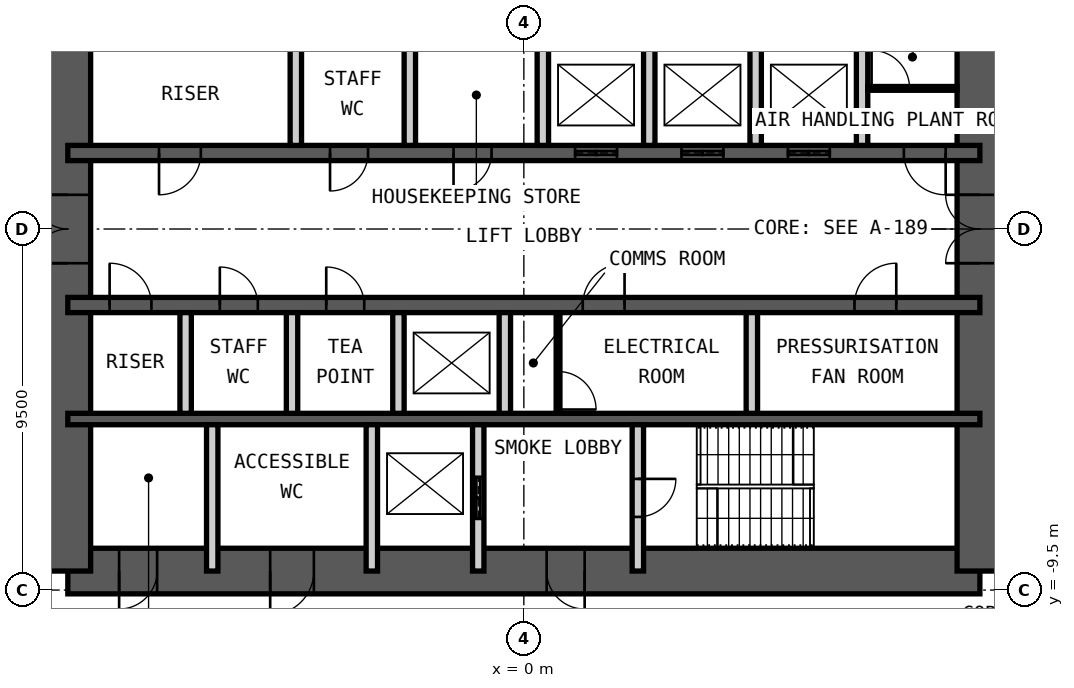
"""IFC4 building model, lengths in metres.
Left out: names, types, materials, properties, quantities, classifications, styles, units other than length and angle.
Written with IfcOpenShell. Run it as: python <this file> out.ifc"""

import sys

from ifc_helpers import new_model, si_unit, direction, frame, frame_2d, origin, place, context, subcontext, project, spatial, rectangle, extrude, element, fill, save


model = new_model("IFC4")
c1 = context("Model", 3, precision=1e-05, world=origin(), true_north=direction((0.0, 1.0)))
c2 = subcontext(c1, "Body", "Model", "MODEL_VIEW")
j1 = project(units=[si_unit("LENGTHUNIT", "METRE"), si_unit("PLANEANGLEUNIT", "RADIAN")], contexts=[c1])
p1 = place(None, origin())
s1 = spatial("IfcSite", under=j1, at=p1, CompositionType="ELEMENT")
p2 = place(p1, origin())
s2 = spatial("IfcBuilding", under=s1, at=p2, CompositionType="ELEMENT")
p3 = place(p2, frame((0.0, 0.0, 205.6)))
s3 = spatial("IfcBuildingStorey", under=s2, at=p3, CompositionType="ELEMENT", Elevation=205.6)
p4 = place(p3, frame((-12.0, -9.0, 0.0), z_axis=(0.0, 0.0, 1.0), x_axis=(1.0, 0.0, 0.0)))
e1 = element("IfcWall", 1, at=p4, inside=s3, PredefinedType="SHEAR", context=c2, shape_type="SweptSolid", body=[
    extrude(rectangle(XDim=24.0, YDim=1.2, at=frame_2d((12.0, 0.0))), origin(), (0.0, 0.0, 1.0), 4.2),
])
p5 = place(p4, frame((1.35, 0.0, 0.0)))
e2 = element("IfcOpeningElement", 2, at=p5, cuts=e1, PredefinedType="OPENING", context=c2, shape_type="SweptSolid", body=[
    extrude(rectangle(XDim=1.0, YDim=2.1, at=frame_2d((0.5, 1.05))), frame((0.0, 0.61, 0.0), z_axis=(0.0, -1.0, 0.0), x_axis=(1.0, 0.0, 0.0)), (0.0, 0.0, 1.0), 1.22),
])
p6 = place(p4, frame((5.325, 0.0, 0.0)))
e3 = element("IfcOpeningElement", 3, at=p6, cuts=e1, PredefinedType="OPENING", context=c2, shape_type="SweptSolid", body=[
    extrude(rectangle(XDim=1.15, YDim=2.1, at=frame_2d((0.575, 1.05))), frame((0.0, 0.61, 0.0), z_axis=(0.0, -1.0, 0.0), x_axis=(1.0, 0.0, 0.0)), (0.0, 0.0, 1.0), 1.22),
])
p7 = place(p4, frame((12.6, 0.0, 0.0)))
e4 = element("IfcOpeningElement", 4, at=p7, cuts=e1, PredefinedType="OPENING", context=c2, shape_type="SweptSolid", body=[
    extrude(rectangle(XDim=1.0, YDim=2.1, at=frame_2d((0.5, 1.05))), frame((0.0, 0.61, 0.0), z_axis=(0.0, -1.0, 0.0), x_axis=(1.0, 0.0, 0.0)), (0.0, 0.0, 1.0), 1.22),
])
p8 = place(p3, frame((12.0, -9.0, 0.0), z_axis=(0.0, 0.0, 1.0), x_axis=(0.0, 1.0, 0.0)))
e5 = element("IfcWall", 5, at=p8, inside=s3, PredefinedType="SHEAR", context=c2, shape_type="SweptSolid", body=[
    extrude(rectangle(XDim=18.0, YDim=1.2, at=frame_2d((9.0, 0.0))), origin(), (0.0, 0.0, 1.0), 4.2),
])
p9 = place(p8, frame((8.1, 0.0, 0.0)))
e6 = element("IfcOpeningElement", 6, at=p9, cuts=e5, PredefinedType="OPENING", context=c2, shape_type="SweptSolid", body=[
    extrude(rectangle(XDim=1.8, YDim=2.1, at=frame_2d((0.9, 1.05))), frame((0.0, 0.61, 0.0), z_axis=(0.0, -1.0, 0.0), x_axis=(1.0, 0.0, 0.0)), (0.0, 0.0, 1.0), 1.22),
])
p10 = place(p3, frame((-12.0, -9.0, 0.0), z_axis=(0.0, 0.0, 1.0), x_axis=(0.0, 1.0, 0.0)))
e7 = element("IfcWall", 7, at=p10, inside=s3, PredefinedType="SHEAR", context=c2, shape_type="SweptSolid", body=[
    extrude(rectangle(XDim=18.0, YDim=1.2, at=frame_2d((9.0, 0.0))), origin(), (0.0, 0.0, 1.0), 4.2),
])
p11 = place(p10, frame((8.1, 0.0, 0.0)))
e8 = element("IfcOpeningElement", 8, at=p11, cuts=e7, PredefinedType="OPENING", context=c2, shape_type="SweptSolid", body=[
    extrude(rectangle(XDim=1.8, YDim=2.1, at=frame_2d((0.9, 1.05))), frame((0.0, 0.61, 0.0), z_axis=(0.0, -1.0, 0.0), x_axis=(1.0, 0.0, 0.0)), (0.0, 0.0, 1.0), 1.22),
])
p12 = place(p3, frame((-12.0, 2.0, 0.0), z_axis=(0.0, 0.0, 1.0), x_axis=(1.0, 0.0, 0.0)))
e9 = element("IfcWall", 9, at=p12, inside=s3, PredefinedType="SHEAR", context=c2, shape_type="SweptSolid", body=[
    extrude(rectangle(XDim=24.0, YDim=0.4, at=frame_2d((12.0, 0.0))), origin(), (0.0, 0.0, 1.0), 4.2),
])
p13 = place(p12, frame((2.4, 0.0, 0.0)))
e10 = element("IfcOpeningElement", 10, at=p13, cuts=e9, PredefinedType="OPENING", context=c2, shape_type="SweptSolid", body=[
    extrude(rectangle(XDim=1.1, YDim=2.1, at=frame_2d((0.55, 1.05))), frame((0.0, 0.21, 0.0), z_axis=(0.0, -1.0, 0.0), x_axis=(1.0, 0.0, 0.0)), (0.0, 0.0, 1.0), 0.42),
])
p14 = place(p12, frame((22.0, 0.0, 0.0)))
e11 = element("IfcOpeningElement", 11, at=p14, cuts=e9, PredefinedType="OPENING", context=c2, shape_type="SweptSolid", body=[
    extrude(rectangle(XDim=1.1, YDim=2.1, at=frame_2d((0.55, 1.05))), frame((0.0, 0.21, 0.0), z_axis=(0.0, -1.0, 0.0), x_axis=(1.0, 0.0, 0.0)), (0.0, 0.0, 1.0), 0.42),
])
p15 = place(p12, frame((10.15, 0.0, 0.0)))
e12 = element("IfcOpeningElement", 12, at=p15, cuts=e9, PredefinedType="OPENING", context=c2, shape_type="SweptSolid", body=[
    extrude(rectangle(XDim=1.0, YDim=2.1, at=frame_2d((0.5, 1.05))), frame((0.0, 0.21, 0.0), z_axis=(0.0, -1.0, 0.0), x_axis=(1.0, 0.0, 0.0)), (0.0, 0.0, 1.0), 0.42),
])
p16 = place(p12, frame((6.9, 0.0, 0.0)))
e13 = element("IfcOpeningElement", 13, at=p16, cuts=e9, PredefinedType="OPENING", context=c2, shape_type="SweptSolid", body=[
    extrude(rectangle(XDim=1.0, YDim=2.1, at=frame_2d((0.5, 1.05))), frame((0.0, 0.21, 0.0), z_axis=(0.0, -1.0, 0.0), x_axis=(1.0, 0.0, 0.0)), (0.0, 0.0, 1.0), 0.42),
])
p17 = place(p12, frame((13.35, 0.0, 0.0)))
e14 = element("IfcOpeningElement", 14, at=p17, cuts=e9, PredefinedType="OPENING", context=c2, shape_type="SweptSolid", body=[
    extrude(rectangle(XDim=1.1, YDim=2.4, at=frame_2d((0.55, 1.2))), frame((0.0, 0.21, 0.0), z_axis=(0.0, -1.0, 0.0), x_axis=(1.0, 0.0, 0.0)), (0.0, 0.0, 1.0), 0.42),
])
p18 = place(p12, frame((16.15, 0.0, 0.0)))
e15 = element("IfcOpeningElement", 15, at=p18, cuts=e9, PredefinedType="OPENING", context=c2, shape_type="SweptSolid", body=[
    extrude(rectangle(XDim=1.1, YDim=2.4, at=frame_2d((0.55, 1.2))), frame((0.0, 0.21, 0.0), z_axis=(0.0, -1.0, 0.0), x_axis=(1.0, 0.0, 0.0)), (0.0, 0.0, 1.0), 0.42),
])
p19 = place(p12, frame((18.95, 0.0, 0.0)))
e16 = element("IfcOpeningElement", 16, at=p19, cuts=e9, PredefinedType="OPENING", context=c2, shape_type="SweptSolid", body=[
    extrude(rectangle(XDim=1.1, YDim=2.4, at=frame_2d((0.55, 1.2))), frame((0.0, 0.21, 0.0), z_axis=(0.0, -1.0, 0.0), x_axis=(1.0, 0.0, 0.0)), (0.0, 0.0, 1.0), 0.42),
])
p20 = place(p3, frame((-12.0, -2.0, 0.0), z_axis=(0.0, 0.0, 1.0), x_axis=(1.0, 0.0, 0.0)))
e17 = element("IfcWall", 17, at=p20, inside=s3, PredefinedType="SHEAR", context=c2, shape_type="SweptSolid", body=[
    extrude(rectangle(XDim=24.0, YDim=0.4, at=frame_2d((12.0, 0.0))), origin(), (0.0, 0.0, 1.0), 4.2),
])
p21 = place(p20, frame((1.1, 0.0, 0.0)))
e18 = element("IfcOpeningElement", 18, at=p21, cuts=e17, PredefinedType="OPENING", context=c2, shape_type="SweptSolid", body=[
    extrude(rectangle(XDim=1.1, YDim=2.1, at=frame_2d((0.55, 1.05))), frame((0.0, 0.21, 0.0), z_axis=(0.0, -1.0, 0.0), x_axis=(1.0, 0.0, 0.0)), (0.0, 0.0, 1.0), 0.42),
])
p22 = place(p20, frame((13.55, 0.0, 0.0)))
e19 = element("IfcOpeningElement", 19, at=p22, cuts=e17, PredefinedType="OPENING", context=c2, shape_type="SweptSolid", body=[
    extrude(rectangle(XDim=1.1, YDim=2.1, at=frame_2d((0.55, 1.05))), frame((0.0, 0.21, 0.0), z_axis=(0.0, -1.0, 0.0), x_axis=(1.0, 0.0, 0.0)), (0.0, 0.0, 1.0), 0.42),
])
p23 = place(p20, frame((20.7, 0.0, 0.0)))
e20 = element("IfcOpeningElement", 20, at=p23, cuts=e17, PredefinedType="OPENING", context=c2, shape_type="SweptSolid", body=[
    extrude(rectangle(XDim=1.1, YDim=2.1, at=frame_2d((0.55, 1.05))), frame((0.0, 0.21, 0.0), z_axis=(0.0, -1.0, 0.0), x_axis=(1.0, 0.0, 0.0)), (0.0, 0.0, 1.0), 0.42),
])
p24 = place(p20, frame((4.0, 0.0, 0.0)))
e21 = element("IfcOpeningElement", 21, at=p24, cuts=e17, PredefinedType="OPENING", context=c2, shape_type="SweptSolid", body=[
    extrude(rectangle(XDim=1.0, YDim=2.1, at=frame_2d((0.5, 1.05))), frame((0.0, 0.21, 0.0), z_axis=(0.0, -1.0, 0.0), x_axis=(1.0, 0.0, 0.0)), (0.0, 0.0, 1.0), 0.42),
])
p25 = place(p20, frame((6.8, 0.0, 0.0)))
e22 = element("IfcOpeningElement", 22, at=p25, cuts=e17, PredefinedType="OPENING", context=c2, shape_type="SweptSolid", body=[
    extrude(rectangle(XDim=1.0, YDim=2.1, at=frame_2d((0.5, 1.05))), frame((0.0, 0.21, 0.0), z_axis=(0.0, -1.0, 0.0), x_axis=(1.0, 0.0, 0.0)), (0.0, 0.0, 1.0), 0.42),
])
p26 = place(p3, frame((-12.0, -5.0, 0.0), z_axis=(0.0, 0.0, 1.0), x_axis=(1.0, 0.0, 0.0)))
e23 = element("IfcWall", 23, at=p26, inside=s3, PredefinedType="SHEAR", context=c2, shape_type="SweptSolid", body=[
    extrude(rectangle(XDim=24.0, YDim=0.3, at=frame_2d((12.0, 0.0))), origin(), (0.0, 0.0, 1.0), 4.2),
])
for number, where, z_axis, x_axis in (
    (24, (-6.0, 2.2, 0.0), (0.0, 0.0, 1.0), (0.0, 1.0, 0.0)),
    (25, (-3.0, 2.2, 0.0), (0.0, 0.0, 1.0), (0.0, 1.0, 0.0)),
    (26, (0.5, 2.2, 0.0), (0.0, 0.0, 1.0), (0.0, 1.0, 0.0)),
    (27, (3.3, 2.2, 0.0), (0.0, 0.0, 1.0), (0.0, 1.0, 0.0)),
    (28, (6.1, 2.2, 0.0), (0.0, 0.0, 1.0), (0.0, 1.0, 0.0)),
    (29, (8.9, 2.2, 0.0), (0.0, 0.0, 1.0), (0.0, 1.0, 0.0)),
    (30, (-8.9, -4.85, 0.0), (0.0, 0.0, 1.0), (0.0, 1.0, 0.0)),
    (31, (-6.1, -4.85, 0.0), (0.0, 0.0, 1.0), (0.0, 1.0, 0.0)),
    (32, (-3.3, -4.85, 0.0), (0.0, 0.0, 1.0), (0.0, 1.0, 0.0)),
    (33, (-0.5, -4.85, 0.0), (0.0, 0.0, 1.0), (0.0, 1.0, 0.0)),
    (34, (6.0, -4.85, 0.0), (0.0, 0.0, 1.0), (0.0, 1.0, 0.0)),
):
    element("IfcWall", number, at=place(p3, frame(where, z_axis=z_axis, x_axis=x_axis)), inside=s3, PredefinedType="PARTITIONING", context=c2, shape_type="SweptSolid", body=[
        extrude(rectangle(XDim=2.65, YDim=0.3, at=frame_2d((1.325, 0.0))), origin(), (0.0, 0.0, 1.0), 3.98),
    ])
for number, where, z_axis, x_axis in (
    (35, (-8.2, -9.0, 0.0), (0.0, 0.0, 1.0), (0.0, 1.0, 0.0)),
    (36, (-4.0, -9.0, 0.0), (0.0, 0.0, 1.0), (0.0, 1.0, 0.0)),
):
    element("IfcWall", number, at=place(p3, frame(where, z_axis=z_axis, x_axis=x_axis)), inside=s3, PredefinedType="PARTITIONING", context=c2, shape_type="SweptSolid", body=[
        extrude(rectangle(XDim=3.85, YDim=0.3, at=frame_2d((1.925, 0.0))), origin(), (0.0, 0.0, 1.0), 3.98),
    ])
p27 = place(p3, frame((-1.2, -9.0, 0.0), z_axis=(0.0, 0.0, 1.0), x_axis=(0.0, 1.0, 0.0)))
e37 = element("IfcWall", 37, at=p27, inside=s3, PredefinedType="PARTITIONING", context=c2, shape_type="SweptSolid", body=[
    extrude(rectangle(XDim=3.85, YDim=0.3, at=frame_2d((1.925, 0.0))), origin(), (0.0, 0.0, 1.0), 3.98),
])
p28 = place(p27, frame((1.375, 0.0, 0.0)))
e38 = element("IfcOpeningElement", 38, at=p28, cuts=e37, PredefinedType="OPENING", context=c2, shape_type="SweptSolid", body=[
    extrude(rectangle(XDim=1.1, YDim=2.4, at=frame_2d((0.55, 1.2))), frame((0.0, 0.16, 0.0), z_axis=(0.0, -1.0, 0.0), x_axis=(1.0, 0.0, 0.0)), (0.0, 0.0, 1.0), 0.32),
])
p29 = place(p3, frame((3.0, -9.0, 0.0), z_axis=(0.0, 0.0, 1.0), x_axis=(0.0, 1.0, 0.0)))
e39 = element("IfcWall", 39, at=p29, inside=s3, PredefinedType="PARTITIONING", context=c2, shape_type="SweptSolid", body=[
    extrude(rectangle(XDim=3.85, YDim=0.3, at=frame_2d((1.925, 0.0))), origin(), (0.0, 0.0, 1.0), 3.98),
])
p30 = place(p29, frame((1.425, 0.0, 0.0)))
e40 = element("IfcOpeningElement", 40, at=p30, cuts=e39, PredefinedType="OPENING", context=c2, shape_type="SweptSolid", body=[
    extrude(rectangle(XDim=1.0, YDim=2.1, at=frame_2d((0.5, 1.05))), frame((0.0, 0.16, 0.0), z_axis=(0.0, -1.0, 0.0), x_axis=(1.0, 0.0, 0.0)), (0.0, 0.0, 1.0), 0.32),
])
p31 = place(p3, frame((0.9, -4.85, 0.0), z_axis=(0.0, 0.0, 1.0), x_axis=(0.0, 1.0, 0.0)))
e41 = element("IfcWall", 41, at=p31, inside=s3, PredefinedType="PARTITIONING", context=c2, shape_type="SweptSolid", body=[
    extrude(rectangle(XDim=2.65, YDim=0.1, at=frame_2d((1.325, 0.0))), origin(), (0.0, 0.0, 1.0), 3.98),
])
p32 = place(p31, frame((0.1, 0.0, 0.0)))
e42 = element("IfcOpeningElement", 42, at=p32, cuts=e41, PredefinedType="OPENING", context=c2, shape_type="SweptSolid", body=[
    extrude(rectangle(XDim=1.0, YDim=2.4, at=frame_2d((0.5, 1.2))), frame((0.0, 0.06, 0.0), z_axis=(0.0, -1.0, 0.0), x_axis=(1.0, 0.0, 0.0)), (0.0, 0.0, 1.0), 0.12),
])
p33 = place(p3, frame((9.05, 3.7, 0.0), z_axis=(0.0, 0.0, 1.0), x_axis=(1.0, 0.0, 0.0)))
e43 = element("IfcWall", 43, at=p33, inside=s3, PredefinedType="PARTITIONING", context=c2, shape_type="SweptSolid", body=[
    extrude(rectangle(XDim=2.35, YDim=0.1, at=frame_2d((1.175, 0.0))), origin(), (0.0, 0.0, 1.0), 3.98),
])
p34 = place(p33, frame((0.1, 0.0, 0.0)))
e44 = element("IfcOpeningElement", 44, at=p34, cuts=e43, PredefinedType="OPENING", context=c2, shape_type="SweptSolid", body=[
    extrude(rectangle(XDim=1.0, YDim=2.4, at=frame_2d((0.5, 1.2))), frame((0.0, 0.06, 0.0), z_axis=(0.0, -1.0, 0.0), x_axis=(1.0, 0.0, 0.0)), (0.0, 0.0, 1.0), 0.12),
])
p35 = place(p5, origin())
e45 = element("IfcDoor", 45, at=p35, inside=s3, OperationType="SINGLE_SWING_LEFT", PredefinedType="DOOR", context=c2, shape_type="SweptSolid", body=[
    extrude(rectangle(XDim=1.0, YDim=2.1, at=frame_2d((0.5, 1.05))), frame((0.0, 0.025, 0.0), z_axis=(0.0, -1.0, 0.0), x_axis=(1.0, 0.0, 0.0)), (0.0, 0.0, 1.0), 0.05),
])
fill(e2, e45)
p36 = place(p6, origin())
e46 = element("IfcDoor", 46, at=p36, inside=s3, OperationType="SINGLE_SWING_LEFT", PredefinedType="DOOR", context=c2, shape_type="SweptSolid", body=[
    extrude(rectangle(XDim=1.15, YDim=2.1, at=frame_2d((0.575, 1.05))), frame((0.0, 0.025, 0.0), z_axis=(0.0, -1.0, 0.0), x_axis=(1.0, 0.0, 0.0)), (0.0, 0.0, 1.0), 0.05),
])
fill(e3, e46)
p37 = place(p7, origin())
e47 = element("IfcDoor", 47, at=p37, inside=s3, OperationType="SINGLE_SWING_RIGHT", PredefinedType="DOOR", context=c2, shape_type="SweptSolid", body=[
    extrude(rectangle(XDim=1.0, YDim=2.1, at=frame_2d((0.5, 1.05))), frame((0.0, 0.025, 0.0), z_axis=(0.0, -1.0, 0.0), x_axis=(1.0, 0.0, 0.0)), (0.0, 0.0, 1.0), 0.05),
])
fill(e4, e47)
p38 = place(p30, origin())
e48 = element("IfcDoor", 48, at=p38, inside=s3, OperationType="SINGLE_SWING_RIGHT", PredefinedType="DOOR", context=c2, shape_type="SweptSolid", body=[
    extrude(rectangle(XDim=1.0, YDim=2.1, at=frame_2d((0.5, 1.05))), frame((0.0, 0.025, 0.0), z_axis=(0.0, -1.0, 0.0), x_axis=(1.0, 0.0, 0.0)), (0.0, 0.0, 1.0), 0.05),
])
fill(e40, e48)
p39 = place(p13, origin())
e49 = element("IfcDoor", 49, at=p39, inside=s3, OperationType="SINGLE_SWING_LEFT", PredefinedType="DOOR", context=c2, shape_type="SweptSolid", body=[
    extrude(rectangle(XDim=1.1, YDim=2.1, at=frame_2d((0.55, 1.05))), frame((0.0, 0.025, 0.0), z_axis=(0.0, -1.0, 0.0), x_axis=(1.0, 0.0, 0.0)), (0.0, 0.0, 1.0), 0.05),
])
fill(e10, e49)
p40 = place(p21, origin())
e50 = element("IfcDoor", 50, at=p40, inside=s3, OperationType="SINGLE_SWING_RIGHT", PredefinedType="DOOR", context=c2, shape_type="SweptSolid", body=[
    extrude(rectangle(XDim=1.1, YDim=2.1, at=frame_2d((0.55, 1.05))), frame((0.0, 0.025, 0.0), z_axis=(0.0, -1.0, 0.0), x_axis=(1.0, 0.0, 0.0)), (0.0, 0.0, 1.0), 0.05),
])
fill(e18, e50)
p41 = place(p14, origin())
e51 = element("IfcDoor", 51, at=p41, inside=s3, OperationType="SINGLE_SWING_RIGHT", PredefinedType="DOOR", context=c2, shape_type="SweptSolid", body=[
    extrude(rectangle(XDim=1.1, YDim=2.1, at=frame_2d((0.55, 1.05))), frame((0.0, 0.025, 0.0), z_axis=(0.0, -1.0, 0.0), x_axis=(1.0, 0.0, 0.0)), (0.0, 0.0, 1.0), 0.05),
])
fill(e11, e51)
p42 = place(p15, origin())
e52 = element("IfcDoor", 52, at=p42, inside=s3, OperationType="SINGLE_SWING_LEFT", PredefinedType="DOOR", context=c2, shape_type="SweptSolid", body=[
    extrude(rectangle(XDim=1.0, YDim=2.1, at=frame_2d((0.5, 1.05))), frame((0.0, 0.025, 0.0), z_axis=(0.0, -1.0, 0.0), x_axis=(1.0, 0.0, 0.0)), (0.0, 0.0, 1.0), 0.05),
])
fill(e12, e52)
p43 = place(p22, origin())
e53 = element("IfcDoor", 53, at=p43, inside=s3, OperationType="SINGLE_SWING_LEFT", PredefinedType="DOOR", context=c2, shape_type="SweptSolid", body=[
    extrude(rectangle(XDim=1.1, YDim=2.1, at=frame_2d((0.55, 1.05))), frame((0.0, 0.025, 0.0), z_axis=(0.0, -1.0, 0.0), x_axis=(1.0, 0.0, 0.0)), (0.0, 0.0, 1.0), 0.05),
])
fill(e19, e53)
p44 = place(p23, origin())
e54 = element("IfcDoor", 54, at=p44, inside=s3, OperationType="SINGLE_SWING_LEFT", PredefinedType="DOOR", context=c2, shape_type="SweptSolid", body=[
    extrude(rectangle(XDim=1.1, YDim=2.1, at=frame_2d((0.55, 1.05))), frame((0.0, 0.025, 0.0), z_axis=(0.0, -1.0, 0.0), x_axis=(1.0, 0.0, 0.0)), (0.0, 0.0, 1.0), 0.05),
])
fill(e20, e54)
p45 = place(p9, origin())
e55 = element("IfcDoor", 55, at=p45, inside=s3, OperationType="DOUBLE_DOOR_DOUBLE_SWING", PredefinedType="DOOR", context=c2, shape_type="SweptSolid", body=[
    extrude(rectangle(XDim=1.8, YDim=2.1, at=frame_2d((0.9, 1.05))), frame((0.0, 0.025, 0.0), z_axis=(0.0, -1.0, 0.0), x_axis=(1.0, 0.0, 0.0)), (0.0, 0.0, 1.0), 0.05),
])
fill(e6, e55)
p46 = place(p11, origin())
e56 = element("IfcDoor", 56, at=p46, inside=s3, OperationType="DOUBLE_DOOR_DOUBLE_SWING", PredefinedType="DOOR", context=c2, shape_type="SweptSolid", body=[
    extrude(rectangle(XDim=1.8, YDim=2.1, at=frame_2d((0.9, 1.05))), frame((0.0, 0.025, 0.0), z_axis=(0.0, -1.0, 0.0), x_axis=(1.0, 0.0, 0.0)), (0.0, 0.0, 1.0), 0.05),
])
fill(e8, e56)
p47 = place(p28, origin())
e57 = element("IfcDoor", 57, at=p47, inside=s3, OperationType="DOUBLE_DOOR_SLIDING", PredefinedType="DOOR", context=c2, shape_type="SweptSolid", body=[
    extrude(rectangle(XDim=1.1, YDim=2.4, at=frame_2d((0.55, 1.2))), frame((0.0, 0.025, 0.0), z_axis=(0.0, -1.0, 0.0), x_axis=(1.0, 0.0, 0.0)), (0.0, 0.0, 1.0), 0.05),
])
fill(e38, e57)
p48 = place(p16, origin())
e58 = element("IfcDoor", 58, at=p48, inside=s3, OperationType="SINGLE_SWING_LEFT", PredefinedType="DOOR", context=c2, shape_type="SweptSolid", body=[
    extrude(rectangle(XDim=1.0, YDim=2.1, at=frame_2d((0.5, 1.05))), frame((0.0, 0.025, 0.0), z_axis=(0.0, -1.0, 0.0), x_axis=(1.0, 0.0, 0.0)), (0.0, 0.0, 1.0), 0.05),
])
fill(e13, e58)
p49 = place(p17, origin())
e59 = element("IfcDoor", 59, at=p49, inside=s3, OperationType="DOUBLE_DOOR_SLIDING", PredefinedType="DOOR", context=c2, shape_type="SweptSolid", body=[
    extrude(rectangle(XDim=1.1, YDim=2.4, at=frame_2d((0.55, 1.2))), frame((0.0, 0.025, 0.0), z_axis=(0.0, -1.0, 0.0), x_axis=(1.0, 0.0, 0.0)), (0.0, 0.0, 1.0), 0.05),
])
fill(e14, e59)
p50 = place(p18, origin())
e60 = element("IfcDoor", 60, at=p50, inside=s3, OperationType="DOUBLE_DOOR_SLIDING", PredefinedType="DOOR", context=c2, shape_type="SweptSolid", body=[
    extrude(rectangle(XDim=1.1, YDim=2.4, at=frame_2d((0.55, 1.2))), frame((0.0, 0.025, 0.0), z_axis=(0.0, -1.0, 0.0), x_axis=(1.0, 0.0, 0.0)), (0.0, 0.0, 1.0), 0.05),
])
fill(e15, e60)
p51 = place(p19, origin())
e61 = element("IfcDoor", 61, at=p51, inside=s3, OperationType="DOUBLE_DOOR_SLIDING", PredefinedType="DOOR", context=c2, shape_type="SweptSolid", body=[
    extrude(rectangle(XDim=1.1, YDim=2.4, at=frame_2d((0.55, 1.2))), frame((0.0, 0.025, 0.0), z_axis=(0.0, -1.0, 0.0), x_axis=(1.0, 0.0, 0.0)), (0.0, 0.0, 1.0), 0.05),
])
fill(e16, e61)
p52 = place(p24, origin())
e62 = element("IfcDoor", 62, at=p52, inside=s3, OperationType="SINGLE_SWING_RIGHT", PredefinedType="DOOR", context=c2, shape_type="SweptSolid", body=[
    extrude(rectangle(XDim=1.0, YDim=2.1, at=frame_2d((0.5, 1.05))), frame((0.0, 0.025, 0.0), z_axis=(0.0, -1.0, 0.0), x_axis=(1.0, 0.0, 0.0)), (0.0, 0.0, 1.0), 0.05),
])
fill(e21, e62)
p53 = place(p25, origin())
e63 = element("IfcDoor", 63, at=p53, inside=s3, OperationType="SINGLE_SWING_RIGHT", PredefinedType="DOOR", context=c2, shape_type="SweptSolid", body=[
    extrude(rectangle(XDim=1.0, YDim=2.1, at=frame_2d((0.5, 1.05))), frame((0.0, 0.025, 0.0), z_axis=(0.0, -1.0, 0.0), x_axis=(1.0, 0.0, 0.0)), (0.0, 0.0, 1.0), 0.05),
])
fill(e22, e63)
p54 = place(p32, origin())
e64 = element("IfcDoor", 64, at=p54, inside=s3, OperationType="SINGLE_SWING_LEFT", PredefinedType="DOOR", context=c2, shape_type="SweptSolid", body=[
    extrude(rectangle(XDim=1.0, YDim=2.4, at=frame_2d((0.5, 1.2))), frame((0.0, 0.025, 0.0), z_axis=(0.0, -1.0, 0.0), x_axis=(1.0, 0.0, 0.0)), (0.0, 0.0, 1.0), 0.05),
])
fill(e42, e64)
p55 = place(p34, origin())
e65 = element("IfcDoor", 65, at=p55, inside=s3, OperationType="SINGLE_SWING_RIGHT", PredefinedType="DOOR", context=c2, shape_type="SweptSolid", body=[
    extrude(rectangle(XDim=1.0, YDim=2.4, at=frame_2d((0.5, 1.2))), frame((0.0, 0.025, 0.0), z_axis=(0.0, -1.0, 0.0), x_axis=(1.0, 0.0, 0.0)), (0.0, 0.0, 1.0), 0.05),
])
fill(e44, e65)
save(model, sys.argv[1])
